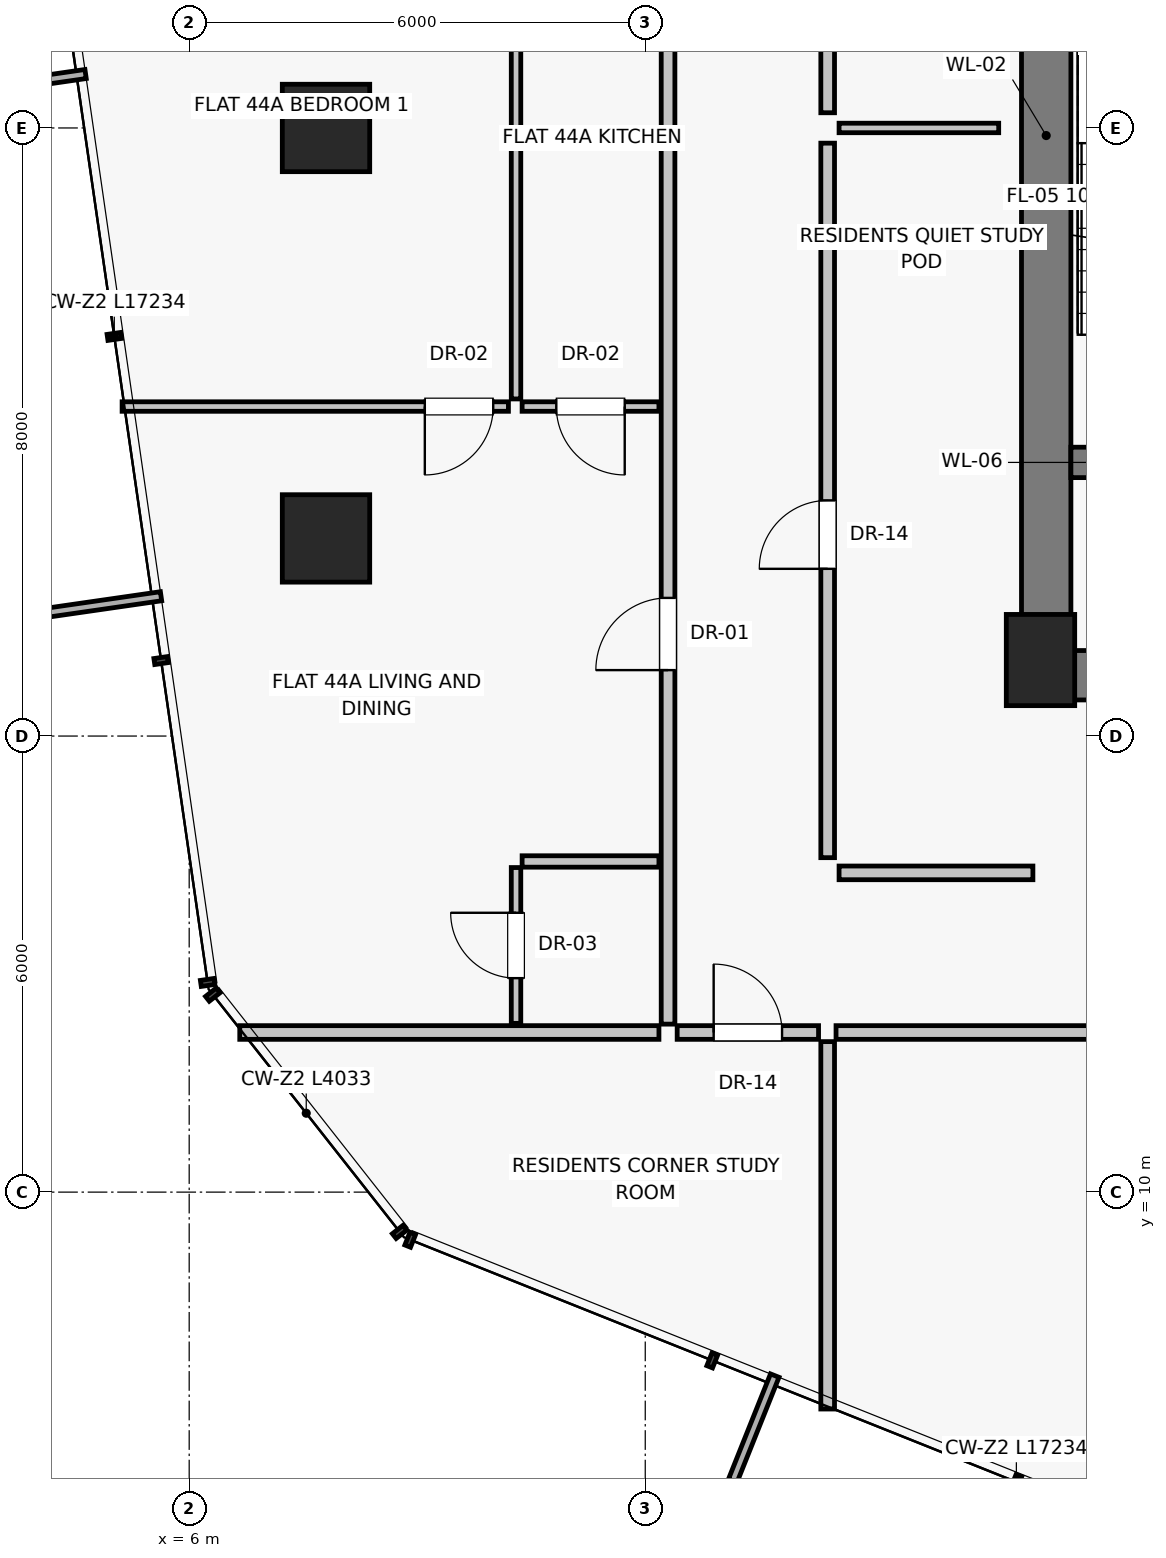
"""IFC4 building model, lengths in metres.
Left out: names, types, materials, properties, quantities, classifications, styles, units other than length and angle.
Written with IfcOpenShell. Run it as: python <this file> out.ifc"""

import sys

from ifc_helpers import new_model, si_unit, direction, frame, frame_2d, origin, origin_2d, place, context, subcontext, project, spatial, rectangle, extrude, source, transform, mapped, element, fill, save


model = new_model("IFC4")
c1 = context("Model", 3, precision=1e-05, world=origin(), true_north=direction((0.0, 1.0)))
c2 = subcontext(c1, "Body", "Model", "MODEL_VIEW")
j1 = project(units=[si_unit("LENGTHUNIT", "METRE"), si_unit("PLANEANGLEUNIT", "RADIAN")], contexts=[c1])
p1 = place(None, origin())
s1 = spatial("IfcSite", under=j1, at=p1, CompositionType="ELEMENT")
p2 = place(p1, origin())
s2 = spatial("IfcBuilding", under=s1, at=p2, CompositionType="ELEMENT")
p3 = place(p2, frame((0.0, 0.0, 155.5)))
s3 = spatial("IfcBuildingStorey", under=s2, at=p3, CompositionType="ELEMENT", Elevation=155.5)
p4 = place(p3, frame((17.2, 17.0, 0.0), z_axis=(0.0, 0.0, 1.0), x_axis=(1.0, 0.0, 0.0)))
e1 = element("IfcColumn", 1, at=p4, inside=s3, PredefinedType="PILASTER", context=c2, shape_type="SweptSolid", body=[
    extrude(rectangle(XDim=0.9, YDim=1.2, at=origin_2d()), origin(), (0.0, 0.0, 1.0), 3.25),
])
for number, where, z_axis, x_axis in (
    (2, (7.8, 24.0, 0.0), (0.0, 0.0, 1.0), (1.0, 0.0, 0.0)),
    (3, (7.8, 18.6, 0.0), (0.0, 0.0, 1.0), (1.0, 0.0, 0.0)),
):
    element("IfcColumn", number, at=place(p3, frame(where, z_axis=z_axis, x_axis=x_axis)), inside=s3, PredefinedType="COLUMN", context=c2, shape_type="SweptSolid", body=[
        extrude(rectangle(XDim=1.15, YDim=1.15, at=origin_2d()), origin(), (0.0, 0.0, 1.0), 3.25),
    ])
p5 = place(p3, frame((17.275, 16.8, 0.0), z_axis=(0.0, 0.0, 1.0), x_axis=(0.0, 1.0, 0.0)))
e4 = element("IfcWall", 4, at=p5, inside=s3, PredefinedType="SHEAR", context=c2, shape_type="SweptSolid", body=[
    extrude(rectangle(XDim=14.2, YDim=0.65, at=frame_2d((7.1, 0.0))), origin(), (0.0, 0.0, 1.0), 2.97),
])
p6 = place(p3, frame((17.2, 16.8, 0.0), z_axis=(0.0, 0.0, 1.0), x_axis=(1.0, 0.0, 0.0)))
e5 = element("IfcWall", 5, at=p6, inside=s3, PredefinedType="SHEAR", context=c2, shape_type="SweptSolid", body=[
    extrude(rectangle(XDim=5.85, YDim=0.65, at=frame_2d((2.925, 0.0))), origin(), (0.0, 0.0, 1.0), 2.97),
])
p7 = place(p6, frame((1.15, 0.0, 0.0)))
e6 = element("IfcOpeningElement", 6, at=p7, cuts=e5, PredefinedType="OPENING", context=c2, shape_type="SweptSolid", body=[
    extrude(rectangle(XDim=1.2, YDim=2.03, at=frame_2d((0.6, 1.015))), frame((0.0, 0.335, 0.0), z_axis=(0.0, -1.0, 0.0), x_axis=(1.0, 0.0, 0.0)), (0.0, 0.0, 1.0), 0.67),
])
p8 = place(p3, frame((17.6, 19.6, 0.0), z_axis=(0.0, 0.0, 1.0), x_axis=(1.0, 0.0, 0.0)))
e7 = element("IfcWall", 7, at=p8, inside=s3, PredefinedType="SHEAR", context=c2, shape_type="SweptSolid", body=[
    extrude(rectangle(XDim=3.4, YDim=0.4, at=frame_2d((1.7, 0.0))), origin(), (0.0, 0.0, 1.0), 2.97),
])
p9 = place(p8, frame((1.05, 0.0, 0.0)))
e8 = element("IfcOpeningElement", 8, at=p9, cuts=e7, PredefinedType="OPENING", context=c2, shape_type="SweptSolid", body=[
    extrude(rectangle(XDim=1.1, YDim=2.03, at=frame_2d((0.55, 1.015))), frame((0.0, 0.21, 0.0), z_axis=(0.0, -1.0, 0.0), x_axis=(1.0, 0.0, 0.0)), (0.0, 0.0, 1.0), 0.42),
])
p10 = place(p3, frame((14.4, 14.4, 0.0), z_axis=(0.0, 0.0, 1.0), x_axis=(0.0, 1.0, 0.0)))
e9 = element("IfcWall", 9, at=p10, inside=s3, PredefinedType="PARTITIONING", context=c2, shape_type="SweptSolid", body=[
    extrude(rectangle(XDim=9.4, YDim=0.18, at=frame_2d((4.7, 0.0))), origin(), (0.0, 0.0, 1.0), 2.97),
])
p11 = place(p10, frame((3.8, 0.0, 0.0)))
e10 = element("IfcOpeningElement", 10, at=p11, cuts=e9, PredefinedType="OPENING", context=c2, shape_type="SweptSolid", body=[
    extrude(rectangle(XDim=0.9, YDim=2.01, at=frame_2d((0.45, 1.005))), frame((0.0, 0.1, 0.0), z_axis=(0.0, -1.0, 0.0), x_axis=(1.0, 0.0, 0.0)), (0.0, 0.0, 1.0), 0.2),
])
p12 = place(p3, frame((14.4, 24.2, 0.0), z_axis=(0.0, 0.0, 1.0), x_axis=(0.0, 1.0, 0.0)))
e11 = element("IfcWall", 11, at=p12, inside=s3, PredefinedType="PARTITIONING", context=c2, shape_type="SweptSolid", body=[
    extrude(rectangle(XDim=9.2, YDim=0.18, at=frame_2d((4.6, 0.0))), origin(), (0.0, 0.0, 1.0), 2.97),
])
p13 = place(p12, frame((3.8, 0.0, 0.0)))
e12 = element("IfcOpeningElement", 12, at=p13, cuts=e11, PredefinedType="OPENING", context=c2, shape_type="SweptSolid", body=[
    extrude(rectangle(XDim=0.9, YDim=2.01, at=frame_2d((0.45, 1.005))), frame((0.0, 0.1, 0.0), z_axis=(0.0, -1.0, 0.0), x_axis=(1.0, 0.0, 0.0)), (0.0, 0.0, 1.0), 0.2),
])
p14 = place(p3, frame((14.55, 24.0, 0.0), z_axis=(0.0, 0.0, 1.0), x_axis=(1.0, 0.0, 0.0)))
e13 = element("IfcWall", 13, at=p14, inside=s3, PredefinedType="PARTITIONING", context=c2, shape_type="SweptSolid", body=[
    extrude(rectangle(XDim=2.1, YDim=0.125, at=frame_2d((1.05, 0.0))), origin(), (0.0, 0.0, 1.0), 2.97),
])
p15 = place(p3, frame((14.55, 14.2, 0.0), z_axis=(0.0, 0.0, 1.0), x_axis=(1.0, 0.0, 0.0)))
e14 = element("IfcWall", 14, at=p15, inside=s3, PredefinedType="PARTITIONING", context=c2, shape_type="SweptSolid", body=[
    extrude(rectangle(XDim=2.55, YDim=0.18, at=frame_2d((1.275, 0.0))), origin(), (0.0, 0.0, 1.0), 2.97),
])
p16 = place(p3, frame((14.4, 11.98, 0.0), z_axis=(0.0, 0.0, 1.0), x_axis=(0.0, -1.0, 0.0)))
e15 = element("IfcWall", 15, at=p16, inside=s3, PredefinedType="PARTITIONING", context=c2, shape_type="SweptSolid", body=[
    extrude(rectangle(XDim=4.833, YDim=0.18, at=frame_2d((2.417, 0.0))), origin(), (0.0, 0.0, 1.0), 2.97),
])
p17 = place(p3, frame((14.51, 12.1, 0.0), z_axis=(0.0, 0.0, 1.0), x_axis=(1.0, 0.0, 0.0)))
e16 = element("IfcWall", 16, at=p17, inside=s3, PredefinedType="PARTITIONING", context=c2, shape_type="SweptSolid", body=[
    extrude(rectangle(XDim=11.574, YDim=0.18, at=frame_2d((5.787, 0.0))), origin(), (0.0, 0.0, 1.0), 2.55),
])
p18 = place(p17, frame((4.887, 0.0, 0.0)))
e17 = element("IfcOpeningElement", 17, at=p18, cuts=e16, PredefinedType="OPENING", context=c2, shape_type="SweptSolid", body=[
    extrude(rectangle(XDim=1.8, YDim=2.25, at=frame_2d((0.9, 1.125))), frame((0.0, 0.1, 0.0), z_axis=(0.0, -1.0, 0.0), x_axis=(1.0, 0.0, 0.0)), (0.0, 0.0, 1.0), 0.2),
])
p19 = place(p3, frame((12.18, 12.1, 0.0), z_axis=(0.0, 0.0, 1.0), x_axis=(-1.0, 0.0, 0.0)))
e18 = element("IfcWall", 18, at=p19, inside=s3, PredefinedType="PARTITIONING", context=c2, shape_type="SweptSolid", body=[
    extrude(rectangle(XDim=5.515, YDim=0.18, at=frame_2d((2.757, 0.0))), origin(), (0.0, 0.0, 1.0), 2.97),
])
p20 = place(p3, frame((12.3, 12.21, 0.0), z_axis=(0.0, 0.0, 1.0), x_axis=(0.0, 1.0, 0.0)))
e19 = element("IfcWall", 19, at=p20, inside=s3, PredefinedType="PARTITIONING", context=c2, shape_type="SweptSolid", body=[
    extrude(rectangle(XDim=14.752, YDim=0.18, at=frame_2d((7.376, 0.0))), origin(), (0.0, 0.0, 1.0), 2.55),
])
p21 = place(p20, frame((4.657, 0.0, 0.0)))
e20 = element("IfcOpeningElement", 20, at=p21, cuts=e19, PredefinedType="OPENING", context=c2, shape_type="SweptSolid", body=[
    extrude(rectangle(XDim=0.95, YDim=2.02, at=frame_2d((0.475, 1.01))), frame((0.0, 0.1, 0.0), z_axis=(0.0, -1.0, 0.0), x_axis=(1.0, 0.0, 0.0)), (0.0, 0.0, 1.0), 0.2),
])
p22 = place(p3, frame((12.18, 14.35, 0.0), z_axis=(0.0, 0.0, 1.0), x_axis=(-1.0, 0.0, 0.0)))
e21 = element("IfcWall", 21, at=p22, inside=s3, PredefinedType="PARTITIONING", context=c2, shape_type="SweptSolid", body=[
    extrude(rectangle(XDim=1.8, YDim=0.15, at=frame_2d((0.9, 0.0))), origin(), (0.0, 0.0, 1.0), 2.97),
])
p23 = place(p3, frame((10.3, 12.22, 0.0), z_axis=(0.0, 0.0, 1.0), x_axis=(0.0, 1.0, 0.0)))
e22 = element("IfcWall", 22, at=p23, inside=s3, PredefinedType="PARTITIONING", context=c2, shape_type="SweptSolid", body=[
    extrude(rectangle(XDim=2.05, YDim=0.125, at=frame_2d((1.025, 0.0))), origin(), (0.0, 0.0, 1.0), 2.97),
])
p24 = place(p23, frame((0.595, 0.0, 0.0)))
e23 = element("IfcOpeningElement", 23, at=p24, cuts=e22, PredefinedType="OPENING", context=c2, shape_type="SweptSolid", body=[
    extrude(rectangle(XDim=0.86, YDim=2.01, at=frame_2d((0.43, 1.005))), frame((0.0, 0.073, 0.0), z_axis=(0.0, -1.0, 0.0), x_axis=(1.0, 0.0, 0.0)), (0.0, 0.0, 1.0), 0.145),
])
p25 = place(p3, frame((12.18, 20.335, 0.0), z_axis=(0.0, 0.0, 1.0), x_axis=(-1.0, 0.0, 0.0)))
e24 = element("IfcWall", 24, at=p25, inside=s3, PredefinedType="PARTITIONING", context=c2, shape_type="SweptSolid", body=[
    extrude(rectangle(XDim=1.8, YDim=0.125, at=frame_2d((0.9, 0.0))), origin(), (0.0, 0.0, 1.0), 2.97),
])
p26 = place(p25, frame((0.45, 0.0, 0.0)))
e25 = element("IfcOpeningElement", 25, at=p26, cuts=e24, PredefinedType="OPENING", context=c2, shape_type="SweptSolid", body=[
    extrude(rectangle(XDim=0.9, YDim=2.01, at=frame_2d((0.45, 1.005))), frame((0.0, 0.073, 0.0), z_axis=(0.0, -1.0, 0.0), x_axis=(1.0, 0.0, 0.0)), (0.0, 0.0, 1.0), 0.145),
])
p27 = place(p3, frame((10.3, 20.435, 0.0), z_axis=(0.0, 0.0, 1.0), x_axis=(0.0, 1.0, 0.0)))
e26 = element("IfcWall", 26, at=p27, inside=s3, PredefinedType="PARTITIONING", context=c2, shape_type="SweptSolid", body=[
    extrude(rectangle(XDim=6.517, YDim=0.125, at=frame_2d((3.258, 0.0))), origin(), (0.0, 0.0, 1.0), 2.97),
])
p28 = place(p3, frame((10.2, 20.335, 0.0), z_axis=(0.0, 0.0, 1.0), x_axis=(-1.0, 0.0, 0.0)))
e27 = element("IfcWall", 27, at=p28, inside=s3, PredefinedType="PARTITIONING", context=c2, shape_type="SweptSolid", body=[
    extrude(rectangle(XDim=5.083, YDim=0.125, at=frame_2d((2.541, 0.0))), origin(), (0.0, 0.0, 1.0), 2.97),
])
p29 = place(p28, frame((0.2, 0.0, 0.0)))
e28 = element("IfcOpeningElement", 28, at=p29, cuts=e27, PredefinedType="OPENING", context=c2, shape_type="SweptSolid", body=[
    extrude(rectangle(XDim=0.9, YDim=2.01, at=frame_2d((0.45, 1.005))), frame((0.0, 0.073, 0.0), z_axis=(0.0, -1.0, 0.0), x_axis=(1.0, 0.0, 0.0)), (0.0, 0.0, 1.0), 0.145),
])
p30 = place(p3, frame((12.42, 12.1, 0.0), z_axis=(0.0, 0.0, 1.0), x_axis=(1.0, 0.0, 0.0)))
e29 = element("IfcWall", 29, at=p30, inside=s3, PredefinedType="PARTITIONING", context=c2, shape_type="SweptSolid", body=[
    extrude(rectangle(XDim=1.86, YDim=0.18, at=frame_2d((0.93, 0.0))), origin(), (0.0, 0.0, 1.0), 2.97),
])
p31 = place(p30, frame((0.48, 0.0, 0.0)))
e30 = element("IfcOpeningElement", 30, at=p31, cuts=e29, PredefinedType="OPENING", context=c2, shape_type="SweptSolid", body=[
    extrude(rectangle(XDim=0.9, YDim=2.01, at=frame_2d((0.45, 1.005))), frame((0.0, 0.1, 0.0), z_axis=(0.0, -1.0, 0.0), x_axis=(1.0, 0.0, 0.0)), (0.0, 0.0, 1.0), 0.2),
])
m1 = source(origin(), c2, "Body", "SweptSolid", [
    extrude(rectangle(XDim=0.9, YDim=2.01, at=frame_2d((0.45, 1.005))), frame((0.0, 0.025, 0.0), z_axis=(0.0, -1.0, 0.0), x_axis=(1.0, 0.0, 0.0)), (0.0, 0.0, 1.0), 0.05),
])
p32 = place(p11, origin())
e31 = element("IfcDoor", 31, at=p32, inside=s3, OperationType="SINGLE_SWING_LEFT", PredefinedType="DOOR", context=c2, shape_type="MappedRepresentation", body=[
    mapped(m1, transform((0.0, 0.0, 0.0), scale=1.0)),
])
fill(e10, e31)
m2 = source(origin(), c2, "Body", "SweptSolid", [
    extrude(rectangle(XDim=0.95, YDim=2.02, at=frame_2d((0.475, 1.01))), frame((0.0, 0.025, 0.0), z_axis=(0.0, -1.0, 0.0), x_axis=(1.0, 0.0, 0.0)), (0.0, 0.0, 1.0), 0.05),
])
p33 = place(p21, origin())
e32 = element("IfcDoor", 32, at=p33, inside=s3, OperationType="SINGLE_SWING_LEFT", PredefinedType="DOOR", context=c2, shape_type="MappedRepresentation", body=[
    mapped(m2, transform((0.0, 0.0, 0.0), scale=1.0)),
])
fill(e20, e32)
m3 = source(origin(), c2, "Body", "SweptSolid", [
    extrude(rectangle(XDim=0.86, YDim=2.01, at=frame_2d((0.43, 1.005))), frame((0.0, 0.025, 0.0), z_axis=(0.0, -1.0, 0.0), x_axis=(1.0, 0.0, 0.0)), (0.0, 0.0, 1.0), 0.05),
])
p34 = place(p24, origin())
e33 = element("IfcDoor", 33, at=p34, inside=s3, OperationType="SINGLE_SWING_RIGHT", PredefinedType="DOOR", context=c2, shape_type="MappedRepresentation", body=[
    mapped(m3, transform((0.0, 0.0, 0.0), scale=1.0)),
])
fill(e23, e33)
p35 = place(p26, origin())
e34 = element("IfcDoor", 34, at=p35, inside=s3, OperationType="SINGLE_SWING_LEFT", PredefinedType="DOOR", context=c2, shape_type="MappedRepresentation", body=[
    mapped(m1, transform((0.0, 0.0, 0.0), scale=1.0)),
])
fill(e25, e34)
p36 = place(p29, origin())
e35 = element("IfcDoor", 35, at=p36, inside=s3, OperationType="SINGLE_SWING_RIGHT", PredefinedType="DOOR", context=c2, shape_type="MappedRepresentation", body=[
    mapped(m1, transform((0.0, 0.0, 0.0), scale=1.0)),
])
fill(e28, e35)
p37 = place(p31, origin())
e36 = element("IfcDoor", 36, at=p37, inside=s3, OperationType="SINGLE_SWING_LEFT", PredefinedType="DOOR", context=c2, shape_type="MappedRepresentation", body=[
    mapped(m1, transform((0.0, 0.0, 0.0), scale=1.0)),
])
fill(e30, e36)
save(model, sys.argv[1])
